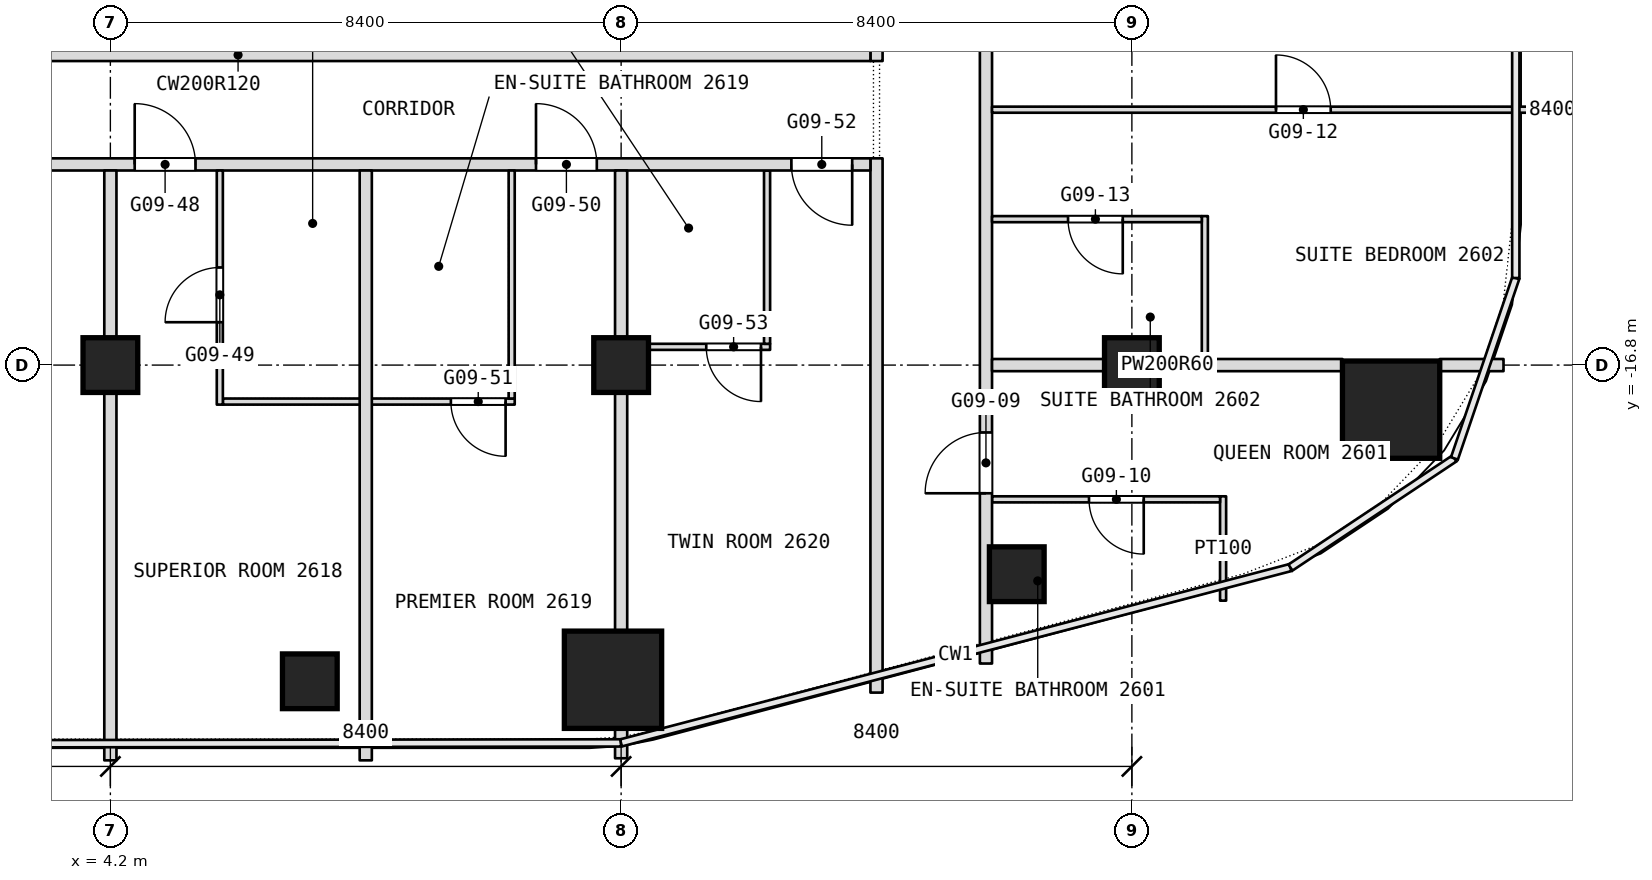
"""IFC4 building model, lengths in metres.
Left out: names, types, materials, properties, quantities, classifications, styles, units other than length and angle.
Written with IfcOpenShell. Run it as: python <this file> out.ifc"""

import sys

from ifc_helpers import new_model, si_unit, direction, frame, frame_2d, origin, origin_2d, place, context, subcontext, project, spatial, rectangle, extrude, element, fill, save


model = new_model("IFC4")
c1 = context("Model", 3, precision=1e-05, world=origin(), true_north=direction((0.0, 1.0)))
c2 = subcontext(c1, "Body", "Model", "MODEL_VIEW")
j1 = project(units=[si_unit("LENGTHUNIT", "METRE"), si_unit("PLANEANGLEUNIT", "RADIAN")], contexts=[c1])
p1 = place(None, origin())
s1 = spatial("IfcSite", under=j1, at=p1, CompositionType="ELEMENT")
p2 = place(p1, origin())
s2 = spatial("IfcBuilding", under=s1, at=p2, CompositionType="ELEMENT")
p3 = place(p2, frame((0.0, 0.0, 119.3)))
s3 = spatial("IfcBuildingStorey", under=s2, at=p3, CompositionType="ELEMENT", Elevation=119.3)
for number, where, z_axis, x_axis in (
    (1, (12.466, -21.975, 0.0), (0.0, 0.0, 1.0), (1.0, 0.0, 0.0)),
    (2, (25.263, -17.533, 0.0), (0.0, 0.0, 1.0), (1.0, 0.0, 0.0)),
):
    element("IfcColumn", number, at=place(p3, frame(where, z_axis=z_axis, x_axis=x_axis)), inside=s3, PredefinedType="COLUMN", context=c2, shape_type="SweptSolid", body=[
        extrude(rectangle(XDim=1.6, YDim=1.6, at=origin_2d()), origin(), (0.0, 0.0, 1.0), 3.6),
    ])
for number, where, z_axis, x_axis in (
    (3, (4.2, -16.8, 0.0), (0.0, 0.0, 1.0), (1.0, 0.0, 0.0)),
    (4, (12.6, -16.8, 0.0), (0.0, 0.0, 1.0), (1.0, 0.0, 0.0)),
    (5, (21.0, -16.8, 0.0), (0.0, 0.0, 1.0), (1.0, 0.0, 0.0)),
    (6, (19.107, -20.239, 0.0), (0.0, 0.0, 1.0), (1.0, 0.0, 0.0)),
    (7, (7.48, -22.0, 0.0), (0.0, 0.0, 1.0), (1.0, 0.0, 0.0)),
):
    element("IfcColumn", number, at=place(p3, frame(where, z_axis=z_axis, x_axis=x_axis)), inside=s3, PredefinedType="COLUMN", context=c2, shape_type="SweptSolid", body=[
        extrude(rectangle(XDim=0.9, YDim=0.9, at=origin_2d()), origin(), (0.0, 0.0, 1.0), 3.6),
    ])
p4 = place(p3, frame((22.5, -20.674, 0.0), z_axis=(0.0, 0.0, 1.0), x_axis=(0.0, 1.0, 0.0)))
e8 = element("IfcWall", 8, at=p4, inside=s3, PredefinedType="PARTITIONING", context=c2, shape_type="SweptSolid", body=[
    extrude(rectangle(XDim=1.716, YDim=0.1, at=frame_2d((0.858, 0.0))), origin(), (0.0, 0.0, 1.0), 3.34),
])
p5 = place(p3, frame((22.2, -16.7, 0.0), z_axis=(0.0, 0.0, 1.0), x_axis=(0.0, 1.0, 0.0)))
e9 = element("IfcWall", 9, at=p5, inside=s3, PredefinedType="PARTITIONING", context=c2, shape_type="SweptSolid", body=[
    extrude(rectangle(XDim=2.35, YDim=0.1, at=frame_2d((1.175, 0.0))), origin(), (0.0, 0.0, 1.0), 3.34),
])
p6 = place(p3, frame((18.7, -19.008, 0.0), z_axis=(0.0, 0.0, 1.0), x_axis=(1.0, 0.0, 0.0)))
e10 = element("IfcWall", 10, at=p6, inside=s3, PredefinedType="PARTITIONING", context=c2, shape_type="SweptSolid", body=[
    extrude(rectangle(XDim=3.75, YDim=0.1, at=frame_2d((1.875, 0.0))), origin(), (0.0, 0.0, 1.0), 3.34),
])
p7 = place(p6, frame((1.595, 0.0, 0.0)))
e11 = element("IfcOpeningElement", 11, at=p7, cuts=e10, PredefinedType="OPENING", context=c2, shape_type="SweptSolid", body=[
    extrude(rectangle(XDim=0.9, YDim=2.1, at=frame_2d((0.45, 1.05))), frame((0.0, 0.05, 0.0), z_axis=(0.0, -1.0, 0.0), x_axis=(1.0, 0.0, 0.0)), (0.0, 0.0, 1.0), 0.1),
])
p8 = place(p3, frame((18.6, -21.708, 0.0), z_axis=(0.0, 0.0, 1.0), x_axis=(0.0, 1.0, 0.0)))
e12 = element("IfcWall", 12, at=p8, inside=s3, PredefinedType="PARTITIONING", context=c2, shape_type="SweptSolid", body=[
    extrude(rectangle(XDim=49.648, YDim=0.2, at=frame_2d((24.824, 0.0))), origin(), (0.0, 0.0, 1.0), 3.34),
])
p9 = place(p8, frame((2.8, 0.0, 0.0)))
e13 = element("IfcOpeningElement", 13, at=p9, cuts=e12, PredefinedType="OPENING", context=c2, shape_type="SweptSolid", body=[
    extrude(rectangle(XDim=1.0, YDim=2.1, at=frame_2d((0.5, 1.05))), frame((0.0, 0.1, 0.0), z_axis=(0.0, -1.0, 0.0), x_axis=(1.0, 0.0, 0.0)), (0.0, 0.0, 1.0), 0.2),
])
p10 = place(p8, frame((10.658, 0.0, 0.0)))
e14 = element("IfcOpeningElement", 14, at=p10, cuts=e12, PredefinedType="OPENING", context=c2, shape_type="SweptSolid", body=[
    extrude(rectangle(XDim=1.1, YDim=2.1, at=frame_2d((0.55, 1.05))), frame((0.0, 0.1, 0.0), z_axis=(0.0, -1.0, 0.0), x_axis=(1.0, 0.0, 0.0)), (0.0, 0.0, 1.0), 0.2),
])
p11 = place(p8, frame((16.608, 0.0, 0.0)))
e15 = element("IfcOpeningElement", 15, at=p11, cuts=e12, PredefinedType="OPENING", context=c2, shape_type="SweptSolid", body=[
    extrude(rectangle(XDim=1.8, YDim=2.1, at=frame_2d((0.9, 1.05))), frame((0.0, 0.1, 0.0), z_axis=(0.0, -1.0, 0.0), x_axis=(1.0, 0.0, 0.0)), (0.0, 0.0, 1.0), 0.2),
])
p12 = place(p8, frame((24.508, 0.0, 0.0)))
e16 = element("IfcOpeningElement", 16, at=p12, cuts=e12, PredefinedType="OPENING", context=c2, shape_type="SweptSolid", body=[
    extrude(rectangle(XDim=1.0, YDim=2.1, at=frame_2d((0.5, 1.05))), frame((0.0, 0.1, 0.0), z_axis=(0.0, -1.0, 0.0), x_axis=(1.0, 0.0, 0.0)), (0.0, 0.0, 1.0), 0.2),
])
p13 = place(p8, frame((26.308, 0.0, 0.0)))
e17 = element("IfcOpeningElement", 17, at=p13, cuts=e12, PredefinedType="OPENING", context=c2, shape_type="SweptSolid", body=[
    extrude(rectangle(XDim=1.0, YDim=2.1, at=frame_2d((0.5, 1.05))), frame((0.0, 0.1, 0.0), z_axis=(0.0, -1.0, 0.0), x_axis=(1.0, 0.0, 0.0)), (0.0, 0.0, 1.0), 0.2),
])
p14 = place(p8, frame((33.708, 0.0, 0.0)))
e18 = element("IfcOpeningElement", 18, at=p14, cuts=e12, PredefinedType="OPENING", context=c2, shape_type="SweptSolid", body=[
    extrude(rectangle(XDim=1.1, YDim=2.1, at=frame_2d((0.55, 1.05))), frame((0.0, 0.1, 0.0), z_axis=(0.0, -1.0, 0.0), x_axis=(1.0, 0.0, 0.0)), (0.0, 0.0, 1.0), 0.2),
])
p15 = place(p8, frame((42.608, 0.0, 0.0)))
e19 = element("IfcOpeningElement", 19, at=p15, cuts=e12, PredefinedType="OPENING", context=c2, shape_type="SweptSolid", body=[
    extrude(rectangle(XDim=1.0, YDim=2.1, at=frame_2d((0.5, 1.05))), frame((0.0, 0.1, 0.0), z_axis=(0.0, -1.0, 0.0), x_axis=(1.0, 0.0, 0.0)), (0.0, 0.0, 1.0), 0.2),
])
p16 = place(p8, frame((44.608, 0.0, 0.0)))
e20 = element("IfcOpeningElement", 20, at=p16, cuts=e12, PredefinedType="OPENING", context=c2, shape_type="SweptSolid", body=[
    extrude(rectangle(XDim=1.0, YDim=2.1, at=frame_2d((0.5, 1.05))), frame((0.0, 0.1, 0.0), z_axis=(0.0, -1.0, 0.0), x_axis=(1.0, 0.0, 0.0)), (0.0, 0.0, 1.0), 0.2),
])
p17 = place(p3, frame((6.05, -17.4, 0.0), z_axis=(0.0, 0.0, 1.0), x_axis=(1.0, 0.0, 0.0)))
e21 = element("IfcWall", 21, at=p17, inside=s3, PredefinedType="PARTITIONING", context=c2, shape_type="SweptSolid", body=[
    extrude(rectangle(XDim=4.8, YDim=0.1, at=frame_2d((2.4, 0.0))), origin(), (0.0, 0.0, 1.0), 3.34),
])
p18 = place(p17, frame((3.75, 0.0, 0.0)))
e22 = element("IfcOpeningElement", 22, at=p18, cuts=e21, PredefinedType="OPENING", context=c2, shape_type="SweptSolid", body=[
    extrude(rectangle(XDim=0.9, YDim=2.1, at=frame_2d((0.45, 1.05))), frame((0.0, 0.05, 0.0), z_axis=(0.0, -1.0, 0.0), x_axis=(1.0, 0.0, 0.0)), (0.0, 0.0, 1.0), 0.1),
])
p19 = place(p3, frame((16.8, -22.186, 0.0), z_axis=(0.0, 0.0, 1.0), x_axis=(0.0, 1.0, 0.0)))
e23 = element("IfcWall", 23, at=p19, inside=s3, PredefinedType="PARTITIONING", context=c2, shape_type="SweptSolid", body=[
    extrude(rectangle(XDim=8.786, YDim=0.2, at=frame_2d((4.393, 0.0))), origin(), (0.0, 0.0, 1.0), 3.34),
])
p20 = place(p3, frame((16.8, -11.8, 0.0), z_axis=(0.0, 0.0, 1.0), x_axis=(0.0, 1.0, 0.0)))
e24 = element("IfcWall", 24, at=p20, inside=s3, PredefinedType="PARTITIONING", context=c2, shape_type="SweptSolid", body=[
    extrude(rectangle(XDim=9.9, YDim=0.2, at=frame_2d((4.95, 0.0))), origin(), (0.0, 0.0, 1.0), 3.34),
])
p21 = place(p3, frame((18.7, -16.8, 0.0), z_axis=(0.0, 0.0, 1.0), x_axis=(1.0, 0.0, 0.0)))
e25 = element("IfcWall", 25, at=p21, inside=s3, PredefinedType="PARTITIONING", context=c2, shape_type="SweptSolid", body=[
    extrude(rectangle(XDim=5.763, YDim=0.2, at=frame_2d((2.881, 0.0))), origin(), (0.0, 0.0, 1.0), 2.89),
])
p22 = place(p3, frame((26.063, -16.8, 0.0), z_axis=(0.0, 0.0, 1.0), x_axis=(1.0, 0.0, 0.0)))
e26 = element("IfcWall", 26, at=p22, inside=s3, PredefinedType="PARTITIONING", context=c2, shape_type="SweptSolid", body=[
    extrude(rectangle(XDim=1.049, YDim=0.2, at=frame_2d((0.524, 0.0))), origin(), (0.0, 0.0, 1.0), 3.34),
])
p23 = place(p3, frame((12.7, -16.5, 0.0), z_axis=(0.0, 0.0, 1.0), x_axis=(1.0, 0.0, 0.0)))
e27 = element("IfcWall", 27, at=p23, inside=s3, PredefinedType="PARTITIONING", context=c2, shape_type="SweptSolid", body=[
    extrude(rectangle(XDim=2.35, YDim=0.1, at=frame_2d((1.175, 0.0))), origin(), (0.0, 0.0, 1.0), 3.34),
])
p24 = place(p23, frame((1.3, 0.0, 0.0)))
e28 = element("IfcOpeningElement", 28, at=p24, cuts=e27, PredefinedType="OPENING", context=c2, shape_type="SweptSolid", body=[
    extrude(rectangle(XDim=0.9, YDim=2.1, at=frame_2d((0.45, 1.05))), frame((0.0, 0.05, 0.0), z_axis=(0.0, -1.0, 0.0), x_axis=(1.0, 0.0, 0.0)), (0.0, 0.0, 1.0), 0.1),
])
p25 = place(p3, frame((15.0, -16.45, 0.0), z_axis=(0.0, 0.0, 1.0), x_axis=(0.0, 1.0, 0.0)))
e29 = element("IfcWall", 29, at=p25, inside=s3, PredefinedType="PARTITIONING", context=c2, shape_type="SweptSolid", body=[
    extrude(rectangle(XDim=2.85, YDim=0.1, at=frame_2d((1.425, 0.0))), origin(), (0.0, 0.0, 1.0), 3.34),
])
p26 = place(p3, frame((18.7, -14.4, 0.0), z_axis=(0.0, 0.0, 1.0), x_axis=(1.0, 0.0, 0.0)))
e30 = element("IfcWall", 30, at=p26, inside=s3, PredefinedType="PARTITIONING", context=c2, shape_type="SweptSolid", body=[
    extrude(rectangle(XDim=3.45, YDim=0.1, at=frame_2d((1.725, 0.0))), origin(), (0.0, 0.0, 1.0), 3.34),
])
p27 = place(p26, frame((1.25, 0.0, 0.0)))
e31 = element("IfcOpeningElement", 31, at=p27, cuts=e30, PredefinedType="OPENING", context=c2, shape_type="SweptSolid", body=[
    extrude(rectangle(XDim=0.9, YDim=2.1, at=frame_2d((0.45, 1.05))), frame((0.0, 0.05, 0.0), z_axis=(0.0, -1.0, 0.0), x_axis=(1.0, 0.0, 0.0)), (0.0, 0.0, 1.0), 0.1),
])
p28 = place(p3, frame((-3.2, -13.5, 0.0), z_axis=(0.0, 0.0, 1.0), x_axis=(1.0, 0.0, 0.0)))
e32 = element("IfcWall", 32, at=p28, inside=s3, PredefinedType="PARTITIONING", context=c2, shape_type="SweptSolid", body=[
    extrude(rectangle(XDim=19.9, YDim=0.2, at=frame_2d((9.95, 0.0))), origin(), (0.0, 0.0, 1.0), 3.34),
])
p29 = place(p28, frame((2.3, 0.0, 0.0)))
e33 = element("IfcOpeningElement", 33, at=p29, cuts=e32, PredefinedType="OPENING", context=c2, shape_type="SweptSolid", body=[
    extrude(rectangle(XDim=1.8, YDim=2.1, at=frame_2d((0.9, 1.05))), frame((0.0, 0.1, 0.0), z_axis=(0.0, -1.0, 0.0), x_axis=(1.0, 0.0, 0.0)), (0.0, 0.0, 1.0), 0.2),
])
p30 = place(p28, frame((7.8, 0.0, 0.0)))
e34 = element("IfcOpeningElement", 34, at=p30, cuts=e32, PredefinedType="OPENING", context=c2, shape_type="SweptSolid", body=[
    extrude(rectangle(XDim=1.0, YDim=2.1, at=frame_2d((0.5, 1.05))), frame((0.0, 0.1, 0.0), z_axis=(0.0, -1.0, 0.0), x_axis=(1.0, 0.0, 0.0)), (0.0, 0.0, 1.0), 0.2),
])
p31 = place(p28, frame((14.4, 0.0, 0.0)))
e35 = element("IfcOpeningElement", 35, at=p31, cuts=e32, PredefinedType="OPENING", context=c2, shape_type="SweptSolid", body=[
    extrude(rectangle(XDim=1.0, YDim=2.1, at=frame_2d((0.5, 1.05))), frame((0.0, 0.1, 0.0), z_axis=(0.0, -1.0, 0.0), x_axis=(1.0, 0.0, 0.0)), (0.0, 0.0, 1.0), 0.2),
])
p32 = place(p28, frame((18.6, 0.0, 0.0)))
e36 = element("IfcOpeningElement", 36, at=p32, cuts=e32, PredefinedType="OPENING", context=c2, shape_type="SweptSolid", body=[
    extrude(rectangle(XDim=1.0, YDim=2.1, at=frame_2d((0.5, 1.05))), frame((0.0, 0.1, 0.0), z_axis=(0.0, -1.0, 0.0), x_axis=(1.0, 0.0, 0.0)), (0.0, 0.0, 1.0), 0.2),
])
p33 = place(p3, frame((12.6, -23.266, 0.0), z_axis=(0.0, 0.0, 1.0), x_axis=(0.0, 1.0, 0.0)))
e37 = element("IfcWall", 37, at=p33, inside=s3, PredefinedType="PARTITIONING", context=c2, shape_type="SweptSolid", body=[
    extrude(rectangle(XDim=0.491, YDim=0.2, at=frame_2d((0.246, 0.0))), origin(), (0.0, 0.0, 1.0), 3.34),
])
p34 = place(p3, frame((12.6, -21.175, 0.0), z_axis=(0.0, 0.0, 1.0), x_axis=(0.0, 1.0, 0.0)))
e38 = element("IfcWall", 38, at=p34, inside=s3, PredefinedType="PARTITIONING", context=c2, shape_type="SweptSolid", body=[
    extrude(rectangle(XDim=7.575, YDim=0.2, at=frame_2d((3.788, 0.0))), origin(), (0.0, 0.0, 1.0), 3.34),
])
p35 = place(p3, frame((18.7, -12.6, 0.0), z_axis=(0.0, 0.0, 1.0), x_axis=(1.0, 0.0, 0.0)))
e39 = element("IfcWall", 39, at=p35, inside=s3, PredefinedType="PARTITIONING", context=c2, shape_type="SweptSolid", body=[
    extrude(rectangle(XDim=8.9, YDim=0.1, at=frame_2d((4.45, 0.0))), origin(), (0.0, 0.0, 1.0), 3.34),
])
p36 = place(p35, frame((4.67, 0.0, 0.0)))
e40 = element("IfcOpeningElement", 40, at=p36, cuts=e39, PredefinedType="OPENING", context=c2, shape_type="SweptSolid", body=[
    extrude(rectangle(XDim=0.9, YDim=2.1, at=frame_2d((0.45, 1.05))), frame((0.0, 0.05, 0.0), z_axis=(0.0, -1.0, 0.0), x_axis=(1.0, 0.0, 0.0)), (0.0, 0.0, 1.0), 0.1),
])
p37 = place(p3, frame((-4.1, -11.7, 0.0), z_axis=(0.0, 0.0, 1.0), x_axis=(1.0, 0.0, 0.0)))
e41 = element("IfcWall", 41, at=p37, inside=s3, PredefinedType="PARTITIONING", context=c2, shape_type="SweptSolid", body=[
    extrude(rectangle(XDim=20.8, YDim=0.2, at=frame_2d((10.4, 0.0))), origin(), (0.0, 0.0, 1.0), 3.34),
])
p38 = place(p3, frame((10.8, -17.35, 0.0), z_axis=(0.0, 0.0, 1.0), x_axis=(0.0, 1.0, 0.0)))
e42 = element("IfcWall", 42, at=p38, inside=s3, PredefinedType="PARTITIONING", context=c2, shape_type="SweptSolid", body=[
    extrude(rectangle(XDim=3.75, YDim=0.1, at=frame_2d((1.875, 0.0))), origin(), (0.0, 0.0, 1.0), 3.34),
])
p39 = place(p3, frame((8.4, -23.3, 0.0), z_axis=(0.0, 0.0, 1.0), x_axis=(0.0, 1.0, 0.0)))
e43 = element("IfcWall", 43, at=p39, inside=s3, PredefinedType="PARTITIONING", context=c2, shape_type="SweptSolid", body=[
    extrude(rectangle(XDim=9.7, YDim=0.2, at=frame_2d((4.85, 0.0))), origin(), (0.0, 0.0, 1.0), 3.34),
])
p40 = place(p3, frame((6.0, -17.45, 0.0), z_axis=(0.0, 0.0, 1.0), x_axis=(0.0, 1.0, 0.0)))
e44 = element("IfcWall", 44, at=p40, inside=s3, PredefinedType="PARTITIONING", context=c2, shape_type="SweptSolid", body=[
    extrude(rectangle(XDim=3.85, YDim=0.1, at=frame_2d((1.925, 0.0))), origin(), (0.0, 0.0, 1.0), 3.34),
])
p41 = place(p40, frame((1.355, 0.0, 0.0)))
e45 = element("IfcOpeningElement", 45, at=p41, cuts=e44, PredefinedType="OPENING", context=c2, shape_type="SweptSolid", body=[
    extrude(rectangle(XDim=0.9, YDim=2.1, at=frame_2d((0.45, 1.05))), frame((0.0, 0.05, 0.0), z_axis=(0.0, -1.0, 0.0), x_axis=(1.0, 0.0, 0.0)), (0.0, 0.0, 1.0), 0.1),
])
p42 = place(p3, frame((4.2, -23.3, 0.0), z_axis=(0.0, 0.0, 1.0), x_axis=(0.0, 1.0, 0.0)))
e46 = element("IfcWall", 46, at=p42, inside=s3, PredefinedType="PARTITIONING", context=c2, shape_type="SweptSolid", body=[
    extrude(rectangle(XDim=9.7, YDim=0.2, at=frame_2d((4.85, 0.0))), origin(), (0.0, 0.0, 1.0), 3.34),
])
p43 = place(p7, origin())
e47 = element("IfcDoor", 47, at=p43, inside=s3, OperationType="SINGLE_SWING_RIGHT", PredefinedType="DOOR", context=c2, shape_type="SweptSolid", body=[
    extrude(rectangle(XDim=0.9, YDim=2.1, at=frame_2d((0.45, 1.05))), frame((0.0, 0.025, 0.0), z_axis=(0.0, -1.0, 0.0), x_axis=(1.0, 0.0, 0.0)), (0.0, 0.0, 1.0), 0.05),
])
fill(e11, e47)
p44 = place(p9, origin())
e48 = element("IfcDoor", 48, at=p44, inside=s3, OperationType="SINGLE_SWING_RIGHT", PredefinedType="DOOR", context=c2, shape_type="SweptSolid", body=[
    extrude(rectangle(XDim=1.0, YDim=2.1, at=frame_2d((0.5, 1.05))), frame((0.0, 0.025, 0.0), z_axis=(0.0, -1.0, 0.0), x_axis=(1.0, 0.0, 0.0)), (0.0, 0.0, 1.0), 0.05),
])
fill(e13, e48)
p45 = place(p18, origin())
e49 = element("IfcDoor", 49, at=p45, inside=s3, OperationType="SINGLE_SWING_RIGHT", PredefinedType="DOOR", context=c2, shape_type="SweptSolid", body=[
    extrude(rectangle(XDim=0.9, YDim=2.1, at=frame_2d((0.45, 1.05))), frame((0.0, 0.025, 0.0), z_axis=(0.0, -1.0, 0.0), x_axis=(1.0, 0.0, 0.0)), (0.0, 0.0, 1.0), 0.05),
])
fill(e22, e49)
p46 = place(p24, origin())
e50 = element("IfcDoor", 50, at=p46, inside=s3, OperationType="SINGLE_SWING_RIGHT", PredefinedType="DOOR", context=c2, shape_type="SweptSolid", body=[
    extrude(rectangle(XDim=0.9, YDim=2.1, at=frame_2d((0.45, 1.05))), frame((0.0, 0.025, 0.0), z_axis=(0.0, -1.0, 0.0), x_axis=(1.0, 0.0, 0.0)), (0.0, 0.0, 1.0), 0.05),
])
fill(e28, e50)
p47 = place(p27, origin())
e51 = element("IfcDoor", 51, at=p47, inside=s3, OperationType="SINGLE_SWING_RIGHT", PredefinedType="DOOR", context=c2, shape_type="SweptSolid", body=[
    extrude(rectangle(XDim=0.9, YDim=2.1, at=frame_2d((0.45, 1.05))), frame((0.0, 0.025, 0.0), z_axis=(0.0, -1.0, 0.0), x_axis=(1.0, 0.0, 0.0)), (0.0, 0.0, 1.0), 0.05),
])
fill(e31, e51)
p48 = place(p30, origin())
e52 = element("IfcDoor", 52, at=p48, inside=s3, OperationType="SINGLE_SWING_RIGHT", PredefinedType="DOOR", context=c2, shape_type="SweptSolid", body=[
    extrude(rectangle(XDim=1.0, YDim=2.1, at=frame_2d((0.5, 1.05))), frame((0.0, 0.025, 0.0), z_axis=(0.0, -1.0, 0.0), x_axis=(1.0, 0.0, 0.0)), (0.0, 0.0, 1.0), 0.05),
])
fill(e34, e52)
p49 = place(p31, origin())
e53 = element("IfcDoor", 53, at=p49, inside=s3, OperationType="SINGLE_SWING_RIGHT", PredefinedType="DOOR", context=c2, shape_type="SweptSolid", body=[
    extrude(rectangle(XDim=1.0, YDim=2.1, at=frame_2d((0.5, 1.05))), frame((0.0, 0.025, 0.0), z_axis=(0.0, -1.0, 0.0), x_axis=(1.0, 0.0, 0.0)), (0.0, 0.0, 1.0), 0.05),
])
fill(e35, e53)
p50 = place(p32, origin())
e54 = element("IfcDoor", 54, at=p50, inside=s3, OperationType="SINGLE_SWING_LEFT", PredefinedType="DOOR", context=c2, shape_type="SweptSolid", body=[
    extrude(rectangle(XDim=1.0, YDim=2.1, at=frame_2d((0.5, 1.05))), frame((0.0, 0.025, 0.0), z_axis=(0.0, -1.0, 0.0), x_axis=(1.0, 0.0, 0.0)), (0.0, 0.0, 1.0), 0.05),
])
fill(e36, e54)
p51 = place(p36, origin())
e55 = element("IfcDoor", 55, at=p51, inside=s3, OperationType="SINGLE_SWING_RIGHT", PredefinedType="DOOR", context=c2, shape_type="SweptSolid", body=[
    extrude(rectangle(XDim=0.9, YDim=2.1, at=frame_2d((0.45, 1.05))), frame((0.0, 0.025, 0.0), z_axis=(0.0, -1.0, 0.0), x_axis=(1.0, 0.0, 0.0)), (0.0, 0.0, 1.0), 0.05),
])
fill(e40, e55)
p52 = place(p41, origin())
e56 = element("IfcDoor", 56, at=p52, inside=s3, OperationType="SINGLE_SWING_RIGHT", PredefinedType="DOOR", context=c2, shape_type="SweptSolid", body=[
    extrude(rectangle(XDim=0.9, YDim=2.1, at=frame_2d((0.45, 1.05))), frame((0.0, 0.025, 0.0), z_axis=(0.0, -1.0, 0.0), x_axis=(1.0, 0.0, 0.0)), (0.0, 0.0, 1.0), 0.05),
])
fill(e45, e56)
save(model, sys.argv[1])
